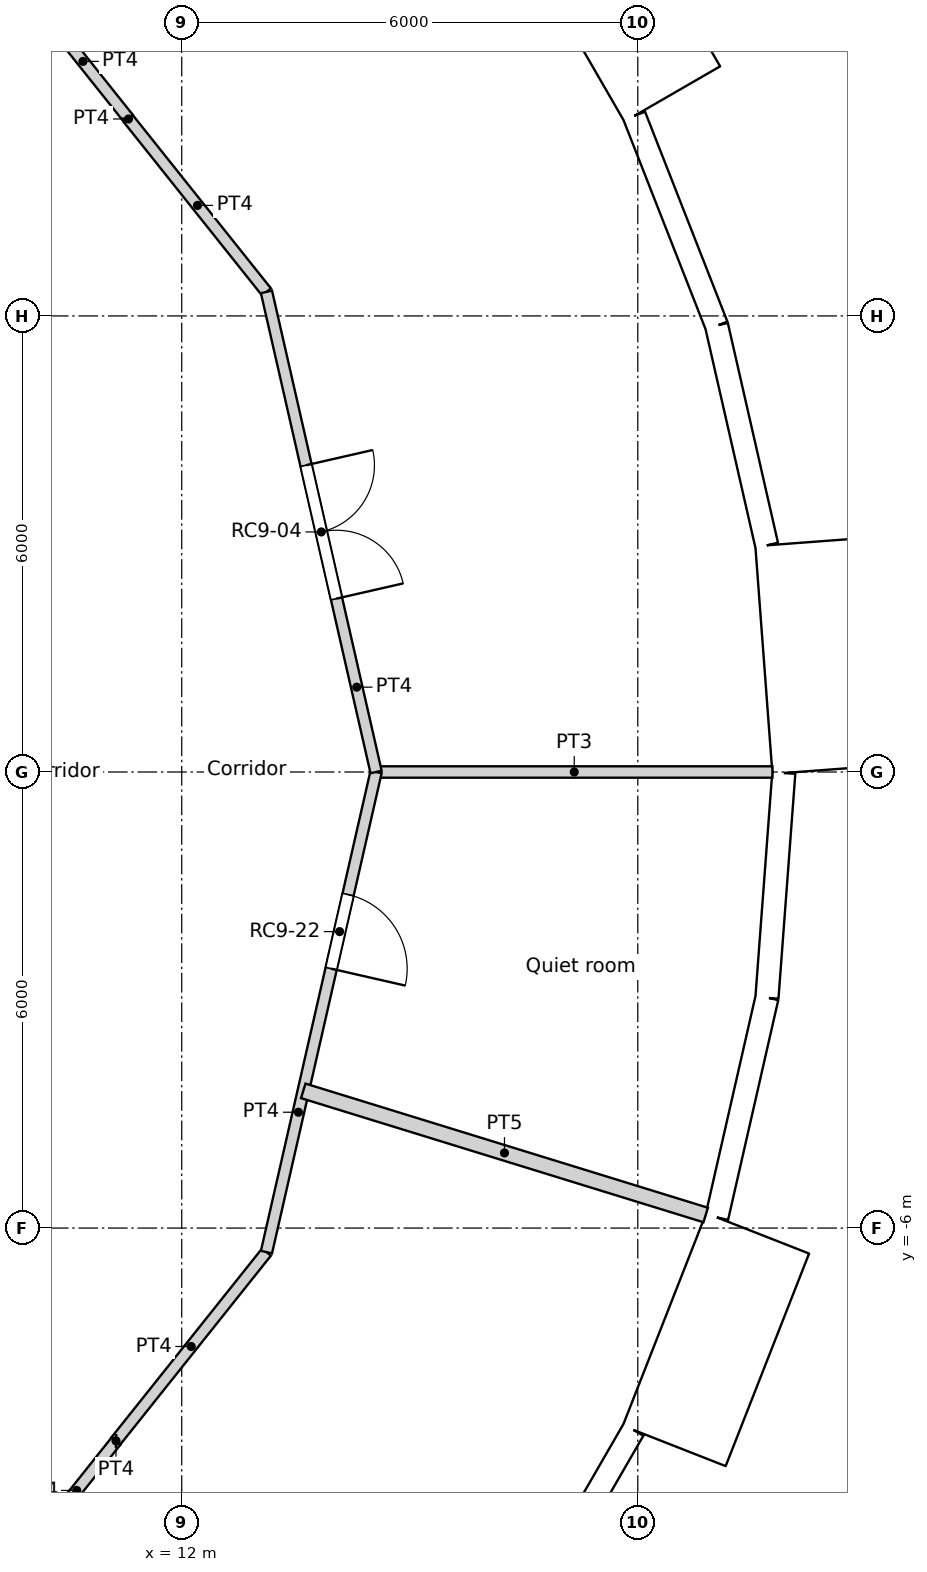
"""IFC4 building model, lengths in metres.
Left out: names, types, materials, properties, quantities, classifications, styles, units other than length and angle.
Written with IfcOpenShell. Run it as: python <this file> out.ifc"""

import sys

from ifc_helpers import new_model, si_unit, direction, frame, frame_2d, origin, origin_2d, place, context, subcontext, project, spatial, rectangle, circle, extrude, element, fill, save


model = new_model("IFC4")
c1 = context("Model", 3, precision=1e-05, world=origin(), true_north=direction((0.0, 1.0)))
c2 = subcontext(c1, "Body", "Model", "MODEL_VIEW")
j1 = project(units=[si_unit("LENGTHUNIT", "METRE"), si_unit("PLANEANGLEUNIT", "RADIAN")], contexts=[c1])
p1 = place(None, origin())
s1 = spatial("IfcSite", under=j1, at=p1, CompositionType="ELEMENT")
p2 = place(p1, origin())
s2 = spatial("IfcBuilding", under=s1, at=p2, CompositionType="ELEMENT")
p3 = place(p2, frame((0.0, 0.0, 316.2)))
s3 = spatial("IfcBuildingStorey", under=s2, at=p3, CompositionType="ELEMENT", Elevation=316.2)
for number, where, z_axis, x_axis in (
    (1, (18.822, 0.0, 0.0), (0.0, 0.0, 1.0), (1.0, 0.0, 0.0)),
    (2, (17.986, 5.548, 0.0), (0.0, 0.0, 1.0), (1.0, 0.0, 0.0)),
    (3, (17.986, -5.548, 0.0), (0.0, 0.0, 1.0), (1.0, 0.0, 0.0)),
):
    element("IfcColumn", number, at=place(p3, frame(where, z_axis=z_axis, x_axis=x_axis)), inside=s3, PredefinedType="COLUMN", context=c2, shape_type="SweptSolid", body=[
        extrude(circle(Radius=0.45, at=origin_2d()), origin(), (0.0, 0.0, 1.0), 3.6),
    ])
p4 = place(p3, frame((20.496, 0.032, -0.35), z_axis=(0.0, 0.0, 1.0), x_axis=(-0.074785902127, 0.997199613339, 0.0)))
e4 = element("IfcWall", 4, at=p4, inside=s3, PredefinedType="ELEMENTEDWALL", context=c2, shape_type="SweptSolid", body=[
    extrude(rectangle(XDim=3.0, YDim=1.45, at=frame_2d((1.5, 0.0))), origin(), (0.0, 0.0, 1.0), 3.6),
])
p5 = place(p4, frame((1.5, 0.0, 1.9)))
e5 = element("IfcOpeningElement", 5, at=p5, cuts=e4, PredefinedType="OPENING", context=c2, shape_type="SweptSolid", body=[
    extrude(circle(Radius=0.9, at=origin_2d()), frame((0.0, 0.735, 0.0), z_axis=(0.0, -1.0, 0.0), x_axis=(1.0, 0.0, 0.0)), (0.0, 0.0, 1.0), 1.47),
])
p6 = place(p3, frame((19.696, 2.984, 0.0), z_axis=(0.0, 0.0, 1.0), x_axis=(-0.222529389789, 0.974925982155, 0.0)))
e6 = element("IfcWall", 6, at=p6, inside=s3, PredefinedType="SOLIDWALL", context=c2, shape_type="SweptSolid", body=[
    extrude(rectangle(XDim=2.962, YDim=0.3, at=frame_2d((1.481, 0.0))), origin(), (0.0, 0.0, 1.0), 3.25),
])
p7 = place(p6, frame((1.481, 0.0, 1.55)))
e7 = element("IfcOpeningElement", 7, at=p7, cuts=e6, PredefinedType="OPENING", context=c2, shape_type="SweptSolid", body=[
    extrude(circle(Radius=0.9, at=origin_2d()), frame((0.0, 0.16, 0.0), z_axis=(0.0, -1.0, 0.0), x_axis=(1.0, 0.0, 0.0)), (0.0, 0.0, 1.0), 0.32),
])
p8 = place(p3, frame((19.037, 5.872, 0.0), z_axis=(0.0, 0.0, 1.0), x_axis=(-0.36530043032, 0.930889679612, 0.0)))
e8 = element("IfcWall", 8, at=p8, inside=s3, PredefinedType="SOLIDWALL", context=c2, shape_type="SweptSolid", body=[
    extrude(rectangle(XDim=2.962, YDim=0.3, at=frame_2d((1.481, 0.0))), origin(), (0.0, 0.0, 1.0), 3.25),
])
p9 = place(p8, frame((1.481, 0.0, 1.55)))
e9 = element("IfcOpeningElement", 9, at=p9, cuts=e8, PredefinedType="OPENING", context=c2, shape_type="SweptSolid", body=[
    extrude(circle(Radius=0.9, at=origin_2d()), frame((0.0, 0.16, 0.0), z_axis=(0.0, -1.0, 0.0), x_axis=(1.0, 0.0, 0.0)), (0.0, 0.0, 1.0), 0.32),
])
p10 = place(p3, frame((18.452, 8.921, -0.35), z_axis=(0.0, 0.0, 1.0), x_axis=(-0.499990139034, 0.866031096941, 0.0)))
e10 = element("IfcWall", 10, at=p10, inside=s3, PredefinedType="ELEMENTEDWALL", context=c2, shape_type="SweptSolid", body=[
    extrude(rectangle(XDim=3.0, YDim=1.45, at=frame_2d((1.5, 0.0))), origin(), (0.0, 0.0, 1.0), 3.6),
])
p11 = place(p10, frame((1.5, 0.0, 1.9)))
e11 = element("IfcOpeningElement", 11, at=p11, cuts=e10, PredefinedType="OPENING", context=c2, shape_type="SweptSolid", body=[
    extrude(circle(Radius=0.9, at=origin_2d()), frame((0.0, 0.735, 0.0), z_axis=(0.0, -1.0, 0.0), x_axis=(1.0, 0.0, 0.0)), (0.0, 0.0, 1.0), 1.47),
])
p12 = place(p3, frame((16.46, -11.222, 0.0), z_axis=(0.0, 0.0, 1.0), x_axis=(0.499950756475, 0.86605383268, 0.0)))
e12 = element("IfcWall", 12, at=p12, inside=s3, PredefinedType="SOLIDWALL", context=c2, shape_type="SweptSolid", body=[
    extrude(rectangle(XDim=2.962, YDim=0.3, at=frame_2d((1.481, 0.0))), origin(), (0.0, 0.0, 1.0), 3.25),
])
p13 = place(p12, frame((1.481, 0.0, 1.55)))
e13 = element("IfcOpeningElement", 13, at=p13, cuts=e12, PredefinedType="OPENING", context=c2, shape_type="SweptSolid", body=[
    extrude(circle(Radius=0.9, at=origin_2d()), frame((0.0, 0.16, 0.0), z_axis=(0.0, -1.0, 0.0), x_axis=(1.0, 0.0, 0.0)), (0.0, 0.0, 1.0), 0.32),
])
p14 = place(p3, frame((18.48, -8.864, -0.35), z_axis=(0.0, 0.0, 1.0), x_axis=(0.36537792632, 0.93085926485, 0.0)))
e14 = element("IfcWall", 14, at=p14, inside=s3, PredefinedType="ELEMENTEDWALL", context=c2, shape_type="SweptSolid", body=[
    extrude(rectangle(XDim=3.0, YDim=1.45, at=frame_2d((1.5, 0.0))), origin(), (0.0, 0.0, 1.0), 3.6),
])
p15 = place(p14, frame((1.5, 0.0, 1.9)))
e15 = element("IfcOpeningElement", 15, at=p15, cuts=e14, PredefinedType="OPENING", context=c2, shape_type="SweptSolid", body=[
    extrude(circle(Radius=0.9, at=origin_2d()), frame((0.0, 0.735, 0.0), z_axis=(0.0, -1.0, 0.0), x_axis=(1.0, 0.0, 0.0)), (0.0, 0.0, 1.0), 1.47),
])
p16 = place(p3, frame((19.04, -5.857, 0.0), z_axis=(0.0, 0.0, 1.0), x_axis=(0.222529389789, 0.974925982155, 0.0)))
e16 = element("IfcWall", 16, at=p16, inside=s3, PredefinedType="SOLIDWALL", context=c2, shape_type="SweptSolid", body=[
    extrude(rectangle(XDim=2.962, YDim=0.3, at=frame_2d((1.481, 0.0))), origin(), (0.0, 0.0, 1.0), 3.25),
])
p17 = place(p16, frame((1.481, 0.0, 1.55)))
e17 = element("IfcOpeningElement", 17, at=p17, cuts=e16, PredefinedType="OPENING", context=c2, shape_type="SweptSolid", body=[
    extrude(circle(Radius=0.9, at=origin_2d()), frame((0.0, 0.16, 0.0), z_axis=(0.0, -1.0, 0.0), x_axis=(1.0, 0.0, 0.0)), (0.0, 0.0, 1.0), 0.32),
])
p18 = place(p3, frame((19.699, -2.969, 0.0), z_axis=(0.0, 0.0, 1.0), x_axis=(0.07474897196, 0.997202382263, 0.0)))
e18 = element("IfcWall", 18, at=p18, inside=s3, PredefinedType="SOLIDWALL", context=c2, shape_type="SweptSolid", body=[
    extrude(rectangle(XDim=2.962, YDim=0.3, at=frame_2d((1.481, 0.0))), origin(), (0.0, 0.0, 1.0), 3.25),
])
p19 = place(p18, frame((1.481, 0.0, 1.55)))
e19 = element("IfcOpeningElement", 19, at=p19, cuts=e18, PredefinedType="OPENING", context=c2, shape_type="SweptSolid", body=[
    extrude(circle(Radius=0.9, at=origin_2d()), frame((0.0, 0.16, 0.0), z_axis=(0.0, -1.0, 0.0), x_axis=(1.0, 0.0, 0.0)), (0.0, 0.0, 1.0), 0.32),
])
p20 = place(p3, frame((10.101, 10.101, 0.0), z_axis=(0.0, 0.0, 1.0), x_axis=(0.623130947784, -0.782117524362, 0.0)))
e20 = element("IfcWall", 20, at=p20, inside=s3, PredefinedType="PARTITIONING", context=c2, shape_type="SweptSolid", body=[
    extrude(rectangle(XDim=1.924, YDim=0.15, at=frame_2d((0.962, 0.0))), origin(), (0.0, 0.0, 1.0), 3.25),
])
p21 = place(p3, frame((11.3, 8.586, 0.0), z_axis=(0.0, 0.0, 1.0), x_axis=(0.0, 1.0, 0.0)))
e21 = element("IfcWall", 21, at=p21, inside=s3, PredefinedType="PARTITIONING", context=c2, shape_type="SweptSolid", body=[
    extrude(rectangle(XDim=0.01, YDim=0.15, at=frame_2d((0.005, 0.0))), origin(), (0.0, 0.0, 1.0), 3.25),
])
p22 = place(p3, frame((11.137, -8.8, 0.0), z_axis=(0.0, 0.0, 1.0), x_axis=(-1.0, 0.0, 0.0)))
e22 = element("IfcWall", 22, at=p22, inside=s3, PredefinedType="PARTITIONING", context=c2, shape_type="SweptSolid", body=[
    extrude(rectangle(XDim=0.003, YDim=0.15, at=frame_2d((0.001, 0.0))), origin(), (0.0, 0.0, 1.0), 3.25),
])
p23 = place(p3, frame((10.101, -10.101, 0.0), z_axis=(0.0, 0.0, 1.0), x_axis=(0.623098344652, 0.782143498913, 0.0)))
e23 = element("IfcWall", 23, at=p23, inside=s3, PredefinedType="PARTITIONING", context=c2, shape_type="SweptSolid", body=[
    extrude(rectangle(XDim=1.661, YDim=0.15, at=frame_2d((0.831, 0.0))), origin(), (0.0, 0.0, 1.0), 3.25),
])
p24 = place(p3, frame((11.3, 8.592, 0.0), z_axis=(0.0, 0.0, 1.0), x_axis=(0.623446514299, -0.781866001185, 0.0)))
e24 = element("IfcWall", 24, at=p24, inside=s3, PredefinedType="PARTITIONING", context=c2, shape_type="SweptSolid", body=[
    extrude(rectangle(XDim=2.911, YDim=0.15, at=frame_2d((1.456, 0.0))), origin(), (0.0, 0.0, 1.0), 3.25),
])
p25 = place(p3, frame((13.115, 6.316, 0.0), z_axis=(0.0, 0.0, 1.0), x_axis=(0.222568978642, -0.97491694505, 0.0)))
e25 = element("IfcWall", 25, at=p25, inside=s3, PredefinedType="PARTITIONING", context=c2, shape_type="SweptSolid", body=[
    extrude(rectangle(XDim=6.479, YDim=0.15, at=frame_2d((3.239, 0.0))), origin(), (0.0, 0.0, 1.0), 3.25),
])
p26 = place(p25, frame((2.339, 0.0, 0.0)))
e26 = element("IfcOpeningElement", 26, at=p26, cuts=e25, PredefinedType="OPENING", context=c2, shape_type="SweptSolid", body=[
    extrude(rectangle(XDim=1.8, YDim=2.1, at=frame_2d((0.9, 1.05))), frame((0.0, 0.075, 0.0), z_axis=(0.0, -1.0, 0.0), x_axis=(1.0, 0.0, 0.0)), (0.0, 0.0, 1.0), 0.15),
])
p27 = place(p3, frame((13.115, -6.316, 0.0), z_axis=(0.0, 0.0, 1.0), x_axis=(0.222533159771, 0.974925121639, 0.0)))
e27 = element("IfcWall", 27, at=p27, inside=s3, PredefinedType="PARTITIONING", context=c2, shape_type="SweptSolid", body=[
    extrude(rectangle(XDim=6.478, YDim=0.15, at=frame_2d((3.239, 0.0))), origin(), (0.0, 0.0, 1.0), 3.25),
])
p28 = place(p27, frame((3.824, 0.0, 0.0)))
e28 = element("IfcOpeningElement", 28, at=p28, cuts=e27, PredefinedType="OPENING", context=c2, shape_type="SweptSolid", body=[
    extrude(rectangle(XDim=1.0, YDim=2.04, at=frame_2d((0.5, 1.02))), frame((0.0, 0.075, 0.0), z_axis=(0.0, -1.0, 0.0), x_axis=(1.0, 0.0, 0.0)), (0.0, 0.0, 1.0), 0.15),
])
p29 = place(p3, frame((11.134, -8.8, 0.0), z_axis=(0.0, 0.0, 1.0), x_axis=(0.623476099415, 0.781842409606, 0.0)))
e29 = element("IfcWall", 29, at=p29, inside=s3, PredefinedType="PARTITIONING", context=c2, shape_type="SweptSolid", body=[
    extrude(rectangle(XDim=3.177, YDim=0.15, at=frame_2d((1.589, 0.0))), origin(), (0.0, 0.0, 1.0), 3.25),
])
p30 = place(p3, frame((14.557, 0.0, 0.0), z_axis=(0.0, 0.0, 1.0), x_axis=(1.0, 0.0, 0.0)))
e30 = element("IfcWall", 30, at=p30, inside=s3, PredefinedType="PARTITIONING", context=c2, shape_type="SweptSolid", body=[
    extrude(rectangle(XDim=5.214, YDim=0.15, at=frame_2d((2.607, 0.0))), origin(), (0.0, 0.0, 1.0), 3.25),
])
p31 = place(p3, frame((13.599, -4.195, 0.0), z_axis=(0.0, 0.0, 1.0), x_axis=(0.955580602693, -0.294729896274, 0.0)))
e31 = element("IfcWall", 31, at=p31, inside=s3, PredefinedType="PARTITIONING", context=c2, shape_type="SweptSolid", body=[
    extrude(rectangle(XDim=5.54, YDim=0.2, at=frame_2d((2.77, 0.0))), origin(), (0.0, 0.0, 1.0), 3.25),
])
p32 = place(p5, origin())
e32 = element("IfcWindow", 32, at=p32, inside=s3, PartitioningType="SINGLE_PANEL", PredefinedType="WINDOW", context=c2, shape_type="SweptSolid", body=[
    extrude(circle(Radius=0.9, at=origin_2d()), frame((0.0, 0.695, 0.0), z_axis=(0.0, -1.0, 0.0), x_axis=(1.0, 0.0, 0.0)), (0.0, 0.0, 1.0), 0.1),
])
fill(e5, e32)
p33 = place(p7, origin())
e33 = element("IfcWindow", 33, at=p33, inside=s3, PartitioningType="SINGLE_PANEL", PredefinedType="WINDOW", context=c2, shape_type="SweptSolid", body=[
    extrude(circle(Radius=0.9, at=origin_2d()), frame((0.0, 0.12, 0.0), z_axis=(0.0, -1.0, 0.0), x_axis=(1.0, 0.0, 0.0)), (0.0, 0.0, 1.0), 0.1),
])
fill(e7, e33)
p34 = place(p9, origin())
e34 = element("IfcWindow", 34, at=p34, inside=s3, PartitioningType="SINGLE_PANEL", PredefinedType="WINDOW", context=c2, shape_type="SweptSolid", body=[
    extrude(circle(Radius=0.9, at=origin_2d()), frame((0.0, 0.12, 0.0), z_axis=(0.0, -1.0, 0.0), x_axis=(1.0, 0.0, 0.0)), (0.0, 0.0, 1.0), 0.1),
])
fill(e9, e34)
p35 = place(p11, origin())
e35 = element("IfcWindow", 35, at=p35, inside=s3, PartitioningType="SINGLE_PANEL", PredefinedType="WINDOW", context=c2, shape_type="SweptSolid", body=[
    extrude(circle(Radius=0.9, at=origin_2d()), frame((0.0, 0.695, 0.0), z_axis=(0.0, -1.0, 0.0), x_axis=(1.0, 0.0, 0.0)), (0.0, 0.0, 1.0), 0.1),
])
fill(e11, e35)
p36 = place(p13, origin())
e36 = element("IfcWindow", 36, at=p36, inside=s3, PartitioningType="SINGLE_PANEL", PredefinedType="WINDOW", context=c2, shape_type="SweptSolid", body=[
    extrude(circle(Radius=0.9, at=origin_2d()), frame((0.0, 0.12, 0.0), z_axis=(0.0, -1.0, 0.0), x_axis=(1.0, 0.0, 0.0)), (0.0, 0.0, 1.0), 0.1),
])
fill(e13, e36)
p37 = place(p15, origin())
e37 = element("IfcWindow", 37, at=p37, inside=s3, PartitioningType="SINGLE_PANEL", PredefinedType="WINDOW", context=c2, shape_type="SweptSolid", body=[
    extrude(circle(Radius=0.9, at=origin_2d()), frame((0.0, 0.695, 0.0), z_axis=(0.0, -1.0, 0.0), x_axis=(1.0, 0.0, 0.0)), (0.0, 0.0, 1.0), 0.1),
])
fill(e15, e37)
p38 = place(p17, origin())
e38 = element("IfcWindow", 38, at=p38, inside=s3, PartitioningType="SINGLE_PANEL", PredefinedType="WINDOW", context=c2, shape_type="SweptSolid", body=[
    extrude(circle(Radius=0.9, at=origin_2d()), frame((0.0, 0.12, 0.0), z_axis=(0.0, -1.0, 0.0), x_axis=(1.0, 0.0, 0.0)), (0.0, 0.0, 1.0), 0.1),
])
fill(e17, e38)
p39 = place(p19, origin())
e39 = element("IfcWindow", 39, at=p39, inside=s3, PartitioningType="SINGLE_PANEL", PredefinedType="WINDOW", context=c2, shape_type="SweptSolid", body=[
    extrude(circle(Radius=0.9, at=origin_2d()), frame((0.0, 0.12, 0.0), z_axis=(0.0, -1.0, 0.0), x_axis=(1.0, 0.0, 0.0)), (0.0, 0.0, 1.0), 0.1),
])
fill(e19, e39)
p40 = place(p26, origin())
e40 = element("IfcDoor", 40, at=p40, inside=s3, OperationType="DOUBLE_DOOR_SINGLE_SWING", PredefinedType="DOOR", context=c2, shape_type="SweptSolid", body=[
    extrude(rectangle(XDim=1.8, YDim=2.1, at=frame_2d((0.9, 1.05))), frame((0.0, 0.025, 0.0), z_axis=(0.0, -1.0, 0.0), x_axis=(1.0, 0.0, 0.0)), (0.0, 0.0, 1.0), 0.05),
])
fill(e26, e40)
p41 = place(p28, origin())
e41 = element("IfcDoor", 41, at=p41, inside=s3, OperationType="SINGLE_SWING_RIGHT", PredefinedType="DOOR", context=c2, shape_type="SweptSolid", body=[
    extrude(rectangle(XDim=1.0, YDim=2.04, at=frame_2d((0.5, 1.02))), frame((0.0, 0.025, 0.0), z_axis=(0.0, -1.0, 0.0), x_axis=(1.0, 0.0, 0.0)), (0.0, 0.0, 1.0), 0.05),
])
fill(e28, e41)
save(model, sys.argv[1])
